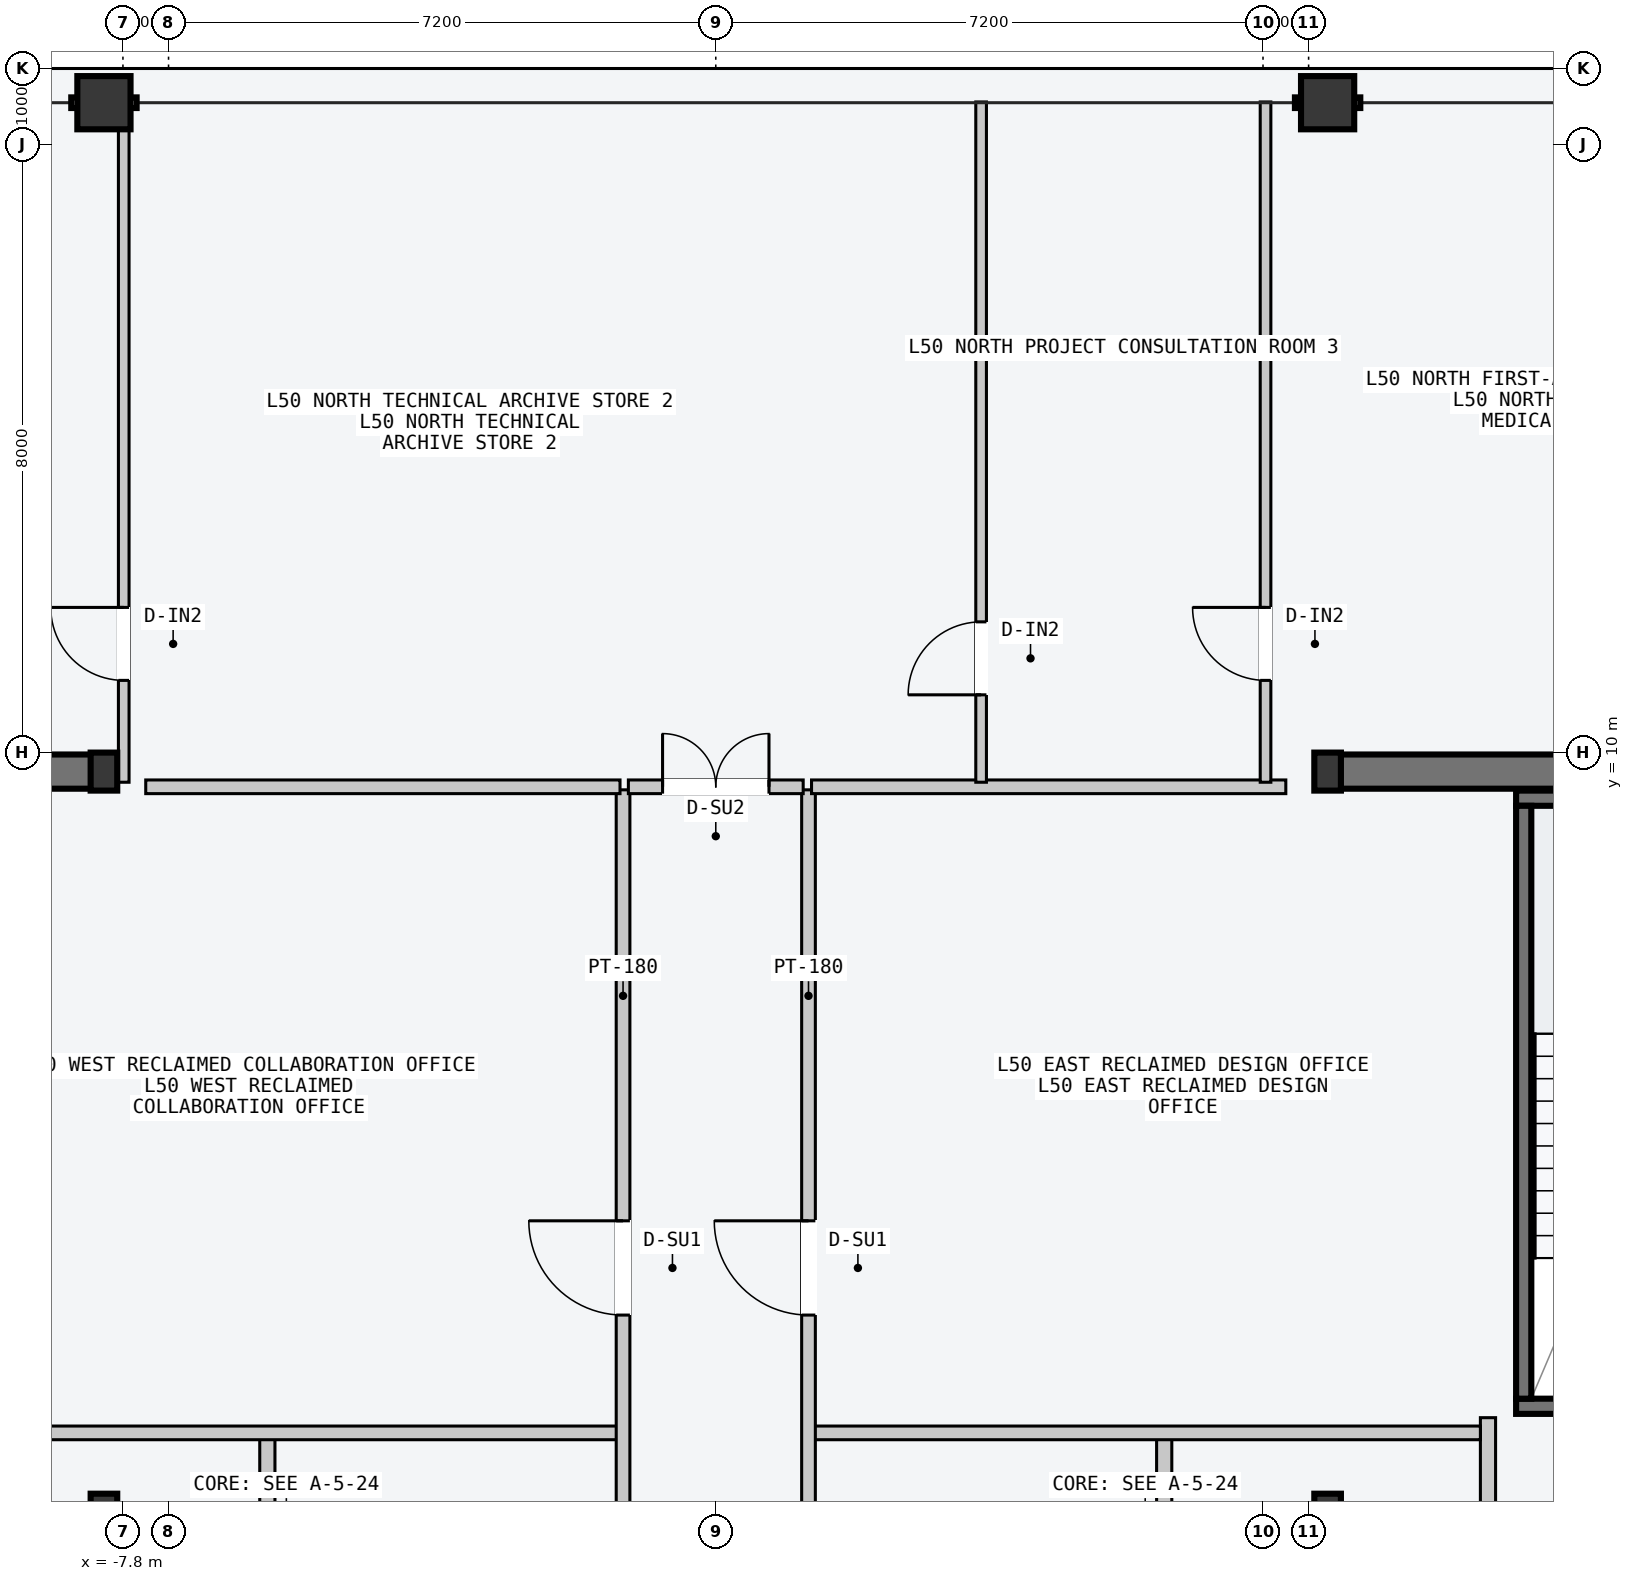
"""IFC4 building model, lengths in metres.
Left out: names, types, materials, properties, quantities, classifications, styles, units other than length and angle.
Written with IfcOpenShell. Run it as: python <this file> out.ifc"""

import sys

from ifc_helpers import new_model, si_unit, direction, frame, frame_2d, origin, origin_2d, place, context, subcontext, project, spatial, rectangle, hollow_rectangle, i_section, extrude, element, fill, save


model = new_model("IFC4")
c1 = context("Model", 3, precision=1e-05, world=origin(), true_north=direction((0.0, 1.0)))
c2 = subcontext(c1, "Body", "Model", "MODEL_VIEW")
j1 = project(units=[si_unit("LENGTHUNIT", "METRE"), si_unit("PLANEANGLEUNIT", "RADIAN")], contexts=[c1])
p1 = place(None, origin())
s1 = spatial("IfcSite", under=j1, at=p1, CompositionType="ELEMENT")
p2 = place(p1, origin())
s2 = spatial("IfcBuilding", under=s1, at=p2, CompositionType="ELEMENT")
p3 = place(p2, frame((0.0, 0.0, 191.1)))
s3 = spatial("IfcBuildingStorey", under=s2, at=p3, CompositionType="ELEMENT", Elevation=191.1)
for number, where, z_axis, x_axis in (
    (1, (-14.53, 9.75, -0.2), (0.0, 0.0, 1.0), (1.0, 0.0, 0.0)),
    (2, (8.07, 9.75, -0.2), (0.0, 0.0, 1.0), (1.0, 0.0, 0.0)),
):
    element("IfcWall", number, at=place(p3, frame(where, z_axis=z_axis, x_axis=x_axis)), inside=s3, PredefinedType="SHEAR", context=c2, shape_type="SweptSolid", body=[
        extrude(rectangle(XDim=6.46, YDim=0.45, at=frame_2d((3.23, 0.0))), origin(), (0.0, 0.0, 1.0), 3.6),
    ])
p4 = place(p3, frame((10.53, 1.4, -0.2), z_axis=(0.0, 0.0, 1.0), x_axis=(1.0, 0.0, 0.0)))
e3 = element("IfcWall", 3, at=p4, inside=s3, PredefinedType="SOLIDWALL", context=c2, shape_type="SweptSolid", body=[
    extrude(rectangle(XDim=3.72, YDim=0.2, at=frame_2d((1.86, 0.0))), origin(), (0.0, 0.0, 1.0), 3.6),
])
p5 = place(p4, frame((1.5, 0.0, 0.2)))
e4 = element("IfcOpeningElement", 4, at=p5, cuts=e3, PredefinedType="OPENING", context=c2, shape_type="SweptSolid", body=[
    extrude(rectangle(XDim=1.12, YDim=2.18, at=frame_2d((0.56, 1.09))), frame((0.0, 0.11, 0.0), z_axis=(0.0, -1.0, 0.0), x_axis=(1.0, 0.0, 0.0)), (0.0, 0.0, 1.0), 0.22),
])
p6 = place(p3, frame((10.53, 9.4, -0.2), z_axis=(0.0, 0.0, 1.0), x_axis=(1.0, 0.0, 0.0)))
e5 = element("IfcWall", 5, at=p6, inside=s3, PredefinedType="SOLIDWALL", context=c2, shape_type="SweptSolid", body=[
    extrude(rectangle(XDim=3.72, YDim=0.2, at=frame_2d((1.86, 0.0))), origin(), (0.0, 0.0, 1.0), 3.6),
])
p7 = place(p3, frame((10.63, 1.5, -0.2), z_axis=(0.0, 0.0, 1.0), x_axis=(0.0, 1.0, 0.0)))
e6 = element("IfcWall", 6, at=p7, inside=s3, PredefinedType="SOLIDWALL", context=c2, shape_type="SweptSolid", body=[
    extrude(rectangle(XDim=7.8, YDim=0.2, at=frame_2d((3.9, 0.0))), origin(), (0.0, 0.0, 1.0), 3.6),
])
for number, where, z_axis, x_axis in (
    (7, (-8.05, 0.0, 0.0), (0.0, 0.0, 1.0), (1.0, 0.0, 0.0)),
    (8, (-8.05, 9.75, 0.0), (0.0, 0.0, 1.0), (1.0, 0.0, 0.0)),
    (9, (8.05, 0.0, 0.0), (0.0, 0.0, 1.0), (1.0, 0.0, 0.0)),
    (10, (8.05, 9.75, 0.0), (0.0, 0.0, 1.0), (1.0, 0.0, 0.0)),
):
    element("IfcColumn", number, at=place(p3, frame(where, z_axis=z_axis, x_axis=x_axis)), inside=s3, PredefinedType="COLUMN", context=c2, shape_type="SweptSolid", body=[
        extrude(i_section(OverallWidth=0.35, OverallDepth=0.5, WebThickness=0.02, FlangeThickness=0.032, at=origin_2d()), origin(), (0.0, 0.0, 1.0), 3.6),
    ])
for number, where, z_axis, x_axis in (
    (11, (-8.05, 18.55, 0.0), (0.0, 0.0, 1.0), (1.0, 0.0, 0.0)),
    (12, (8.05, 18.55, 0.0), (0.0, 0.0, 1.0), (1.0, 0.0, 0.0)),
):
    element("IfcColumn", number, at=place(p3, frame(where, z_axis=z_axis, x_axis=x_axis)), inside=s3, PredefinedType="COLUMN", context=c2, shape_type="SweptSolid", body=[
        extrude(hollow_rectangle(XDim=0.7, YDim=0.7, WallThickness=0.03, at=origin_2d()), origin(), (0.0, 0.0, 1.0), 3.6),
    ])
p8 = place(p3, frame((-5.9, -9.45, 0.0), z_axis=(0.0, 0.0, 1.0), x_axis=(0.0, 1.0, 0.0)))
e13 = element("IfcWall", 13, at=p8, inside=s3, PredefinedType="PARTITIONING", context=c2, shape_type="SweptSolid", body=[
    extrude(rectangle(XDim=10.5, YDim=0.2, at=frame_2d((5.25, 0.0))), origin(), (0.0, 0.0, 1.0), 3.4),
])
p9 = place(p8, frame((3.9, 0.0, 0.0)))
e14 = element("IfcOpeningElement", 14, at=p9, cuts=e13, PredefinedType="OPENING", context=c2, shape_type="SweptSolid", body=[
    extrude(rectangle(XDim=1.5, YDim=2.2, at=frame_2d((0.75, 1.1))), frame((0.0, 0.11, 0.0), z_axis=(0.0, -1.0, 0.0), x_axis=(1.0, 0.0, 0.0)), (0.0, 0.0, 1.0), 0.22),
])
p10 = place(p3, frame((5.9, -9.45, 0.0), z_axis=(0.0, 0.0, 1.0), x_axis=(0.0, 1.0, 0.0)))
e15 = element("IfcWall", 15, at=p10, inside=s3, PredefinedType="PARTITIONING", context=c2, shape_type="SweptSolid", body=[
    extrude(rectangle(XDim=10.5, YDim=0.2, at=frame_2d((5.25, 0.0))), origin(), (0.0, 0.0, 1.0), 3.4),
])
p11 = place(p10, frame((3.9, 0.0, 0.0)))
e16 = element("IfcOpeningElement", 16, at=p11, cuts=e15, PredefinedType="OPENING", context=c2, shape_type="SweptSolid", body=[
    extrude(rectangle(XDim=1.5, YDim=2.2, at=frame_2d((0.75, 1.1))), frame((0.0, 0.11, 0.0), z_axis=(0.0, -1.0, 0.0), x_axis=(1.0, 0.0, 0.0)), (0.0, 0.0, 1.0), 0.22),
])
p12 = place(p3, frame((10.16, -2.55, 0.0), z_axis=(0.0, 0.0, 1.0), x_axis=(0.0, 1.0, 0.0)))
e17 = element("IfcWall", 17, at=p12, inside=s3, PredefinedType="PARTITIONING", context=c2, shape_type="SweptSolid", body=[
    extrude(rectangle(XDim=3.8, YDim=0.2, at=frame_2d((1.9, 0.0))), origin(), (0.0, 0.0, 1.0), 3.4),
])
p13 = place(p12, frame((1.3, 0.0, 0.0)))
e18 = element("IfcOpeningElement", 18, at=p13, cuts=e17, PredefinedType="OPENING", context=c2, shape_type="SweptSolid", body=[
    extrude(rectangle(XDim=1.1, YDim=2.15, at=frame_2d((0.55, 1.075))), frame((0.0, 0.11, 0.0), z_axis=(0.0, -1.0, 0.0), x_axis=(1.0, 0.0, 0.0)), (0.0, 0.0, 1.0), 0.22),
])
p14 = place(p3, frame((-10.05, 1.05, 0.0), z_axis=(0.0, 0.0, 1.0), x_axis=(1.0, 0.0, 0.0)))
e19 = element("IfcWall", 19, at=p14, inside=s3, PredefinedType="PARTITIONING", context=c2, shape_type="SweptSolid", body=[
    extrude(rectangle(XDim=8.79, YDim=0.18, at=frame_2d((4.395, 0.0))), origin(), (0.0, 0.0, 1.0), 3.4),
])
p15 = place(p3, frame((-1.22, -3.5, 0.0), z_axis=(0.0, 0.0, 1.0), x_axis=(0.0, 1.0, 0.0)))
e20 = element("IfcWall", 20, at=p15, inside=s3, PredefinedType="PARTITIONING", context=c2, shape_type="SweptSolid", body=[
    extrude(rectangle(XDim=13.01, YDim=0.18, at=frame_2d((6.505, 0.0))), origin(), (0.0, 0.0, 1.0), 3.4),
])
p16 = place(p15, frame((6.1, 0.0, 0.0)))
e21 = element("IfcOpeningElement", 21, at=p16, cuts=e20, PredefinedType="OPENING", context=c2, shape_type="SweptSolid", body=[
    extrude(rectangle(XDim=1.24, YDim=2.24, at=frame_2d((0.62, 1.12))), frame((0.0, 0.1, 0.0), z_axis=(0.0, -1.0, 0.0), x_axis=(1.0, 0.0, 0.0)), (0.0, 0.0, 1.0), 0.2),
])
p17 = place(p15, frame((1.6, 0.0, 0.0)))
e22 = element("IfcOpeningElement", 22, at=p17, cuts=e20, PredefinedType="OPENING", context=c2, shape_type="SweptSolid", body=[
    extrude(rectangle(XDim=0.96, YDim=2.18, at=frame_2d((0.48, 1.09))), frame((0.0, 0.1, 0.0), z_axis=(0.0, -1.0, 0.0), x_axis=(1.0, 0.0, 0.0)), (0.0, 0.0, 1.0), 0.2),
])
p18 = place(p3, frame((-7.5, 9.55, 0.0), z_axis=(0.0, 0.0, 1.0), x_axis=(1.0, 0.0, 0.0)))
e23 = element("IfcWall", 23, at=p18, inside=s3, PredefinedType="PARTITIONING", context=c2, shape_type="SweptSolid", body=[
    extrude(rectangle(XDim=6.24, YDim=0.18, at=frame_2d((3.12, 0.0))), origin(), (0.0, 0.0, 1.0), 3.4),
])
p19 = place(p3, frame((1.26, 1.05, 0.0), z_axis=(0.0, 0.0, 1.0), x_axis=(1.0, 0.0, 0.0)))
e24 = element("IfcWall", 24, at=p19, inside=s3, PredefinedType="PARTITIONING", context=c2, shape_type="SweptSolid", body=[
    extrude(rectangle(XDim=8.8, YDim=0.18, at=frame_2d((4.4, 0.0))), origin(), (0.0, 0.0, 1.0), 3.4),
])
p20 = place(p3, frame((1.22, -3.5, 0.0), z_axis=(0.0, 0.0, 1.0), x_axis=(0.0, 1.0, 0.0)))
e25 = element("IfcWall", 25, at=p20, inside=s3, PredefinedType="PARTITIONING", context=c2, shape_type="SweptSolid", body=[
    extrude(rectangle(XDim=13.01, YDim=0.18, at=frame_2d((6.505, 0.0))), origin(), (0.0, 0.0, 1.0), 3.4),
])
p21 = place(p20, frame((6.1, 0.0, 0.0)))
e26 = element("IfcOpeningElement", 26, at=p21, cuts=e25, PredefinedType="OPENING", context=c2, shape_type="SweptSolid", body=[
    extrude(rectangle(XDim=1.24, YDim=2.24, at=frame_2d((0.62, 1.12))), frame((0.0, 0.1, 0.0), z_axis=(0.0, -1.0, 0.0), x_axis=(1.0, 0.0, 0.0)), (0.0, 0.0, 1.0), 0.2),
])
p22 = place(p20, frame((1.6, 0.0, 0.0)))
e27 = element("IfcOpeningElement", 27, at=p22, cuts=e25, PredefinedType="OPENING", context=c2, shape_type="SweptSolid", body=[
    extrude(rectangle(XDim=0.96, YDim=2.18, at=frame_2d((0.48, 1.09))), frame((0.0, 0.1, 0.0), z_axis=(0.0, -1.0, 0.0), x_axis=(1.0, 0.0, 0.0)), (0.0, 0.0, 1.0), 0.2),
])
p23 = place(p3, frame((1.26, 9.55, 0.0), z_axis=(0.0, 0.0, 1.0), x_axis=(1.0, 0.0, 0.0)))
e28 = element("IfcWall", 28, at=p23, inside=s3, PredefinedType="PARTITIONING", context=c2, shape_type="SweptSolid", body=[
    extrude(rectangle(XDim=6.24, YDim=0.18, at=frame_2d((3.12, 0.0))), origin(), (0.0, 0.0, 1.0), 3.4),
])
p24 = place(p3, frame((-7.79, 9.61, 0.0), z_axis=(0.0, 0.0, 1.0), x_axis=(0.0, 1.0, 0.0)))
e29 = element("IfcWall", 29, at=p24, inside=s3, PredefinedType="PARTITIONING", context=c2, shape_type="SweptSolid", body=[
    extrude(rectangle(XDim=8.95, YDim=0.14, at=frame_2d((4.475, 0.0))), origin(), (0.0, 0.0, 1.0), 3.4),
])
p25 = place(p24, frame((1.34, 0.0, 0.0)))
e30 = element("IfcOpeningElement", 30, at=p25, cuts=e29, PredefinedType="OPENING", context=c2, shape_type="SweptSolid", body=[
    extrude(rectangle(XDim=0.96, YDim=2.18, at=frame_2d((0.48, 1.09))), frame((0.0, 0.08, 0.0), z_axis=(0.0, -1.0, 0.0), x_axis=(1.0, 0.0, 0.0)), (0.0, 0.0, 1.0), 0.16),
])
p26 = place(p3, frame((3.491, 9.61, 0.0), z_axis=(0.0, 0.0, 1.0), x_axis=(0.0, 1.0, 0.0)))
e31 = element("IfcWall", 31, at=p26, inside=s3, PredefinedType="PARTITIONING", context=c2, shape_type="SweptSolid", body=[
    extrude(rectangle(XDim=8.95, YDim=0.14, at=frame_2d((4.475, 0.0))), origin(), (0.0, 0.0, 1.0), 3.4),
])
p27 = place(p26, frame((1.15, 0.0, 0.0)))
e32 = element("IfcOpeningElement", 32, at=p27, cuts=e31, PredefinedType="OPENING", context=c2, shape_type="SweptSolid", body=[
    extrude(rectangle(XDim=0.96, YDim=2.18, at=frame_2d((0.48, 1.09))), frame((0.0, 0.08, 0.0), z_axis=(0.0, -1.0, 0.0), x_axis=(1.0, 0.0, 0.0)), (0.0, 0.0, 1.0), 0.16),
])
p28 = place(p3, frame((7.233, 9.61, 0.0), z_axis=(0.0, 0.0, 1.0), x_axis=(0.0, 1.0, 0.0)))
e33 = element("IfcWall", 33, at=p28, inside=s3, PredefinedType="PARTITIONING", context=c2, shape_type="SweptSolid", body=[
    extrude(rectangle(XDim=8.95, YDim=0.14, at=frame_2d((4.475, 0.0))), origin(), (0.0, 0.0, 1.0), 3.4),
])
p29 = place(p28, frame((1.34, 0.0, 0.0)))
e34 = element("IfcOpeningElement", 34, at=p29, cuts=e33, PredefinedType="OPENING", context=c2, shape_type="SweptSolid", body=[
    extrude(rectangle(XDim=0.96, YDim=2.18, at=frame_2d((0.48, 1.09))), frame((0.0, 0.08, 0.0), z_axis=(0.0, -1.0, 0.0), x_axis=(1.0, 0.0, 0.0)), (0.0, 0.0, 1.0), 0.16),
])
p30 = place(p3, frame((-1.15, 9.55, 0.0), z_axis=(0.0, 0.0, 1.0), x_axis=(1.0, 0.0, 0.0)))
e35 = element("IfcWall", 35, at=p30, inside=s3, PredefinedType="PARTITIONING", context=c2, shape_type="SweptSolid", body=[
    extrude(rectangle(XDim=2.3, YDim=0.18, at=frame_2d((1.15, 0.0))), origin(), (0.0, 0.0, 1.0), 3.4),
])
p31 = place(p30, frame((0.45, 0.0, 0.0)))
e36 = element("IfcOpeningElement", 36, at=p31, cuts=e35, PredefinedType="OPENING", context=c2, shape_type="SweptSolid", body=[
    extrude(rectangle(XDim=1.4, YDim=2.2, at=frame_2d((0.7, 1.1))), frame((0.0, 0.1, 0.0), z_axis=(0.0, -1.0, 0.0), x_axis=(1.0, 0.0, 0.0)), (0.0, 0.0, 1.0), 0.2),
])
p32 = place(p16, origin())
e37 = element("IfcDoor", 37, at=p32, inside=s3, OperationType="SINGLE_SWING_RIGHT", PredefinedType="DOOR", context=c2, shape_type="SweptSolid", body=[
    extrude(rectangle(XDim=1.24, YDim=2.24, at=frame_2d((0.62, 1.12))), frame((0.0, 0.025, 0.0), z_axis=(0.0, -1.0, 0.0), x_axis=(1.0, 0.0, 0.0)), (0.0, 0.0, 1.0), 0.05),
])
fill(e21, e37)
p33 = place(p21, origin())
e38 = element("IfcDoor", 38, at=p33, inside=s3, OperationType="SINGLE_SWING_RIGHT", PredefinedType="DOOR", context=c2, shape_type="SweptSolid", body=[
    extrude(rectangle(XDim=1.24, YDim=2.24, at=frame_2d((0.62, 1.12))), frame((0.0, 0.025, 0.0), z_axis=(0.0, -1.0, 0.0), x_axis=(1.0, 0.0, 0.0)), (0.0, 0.0, 1.0), 0.05),
])
fill(e26, e38)
p34 = place(p25, origin())
e39 = element("IfcDoor", 39, at=p34, inside=s3, OperationType="SINGLE_SWING_RIGHT", PredefinedType="DOOR", context=c2, shape_type="SweptSolid", body=[
    extrude(rectangle(XDim=0.96, YDim=2.18, at=frame_2d((0.48, 1.09))), frame((0.0, 0.025, 0.0), z_axis=(0.0, -1.0, 0.0), x_axis=(1.0, 0.0, 0.0)), (0.0, 0.0, 1.0), 0.05),
])
fill(e30, e39)
p35 = place(p27, origin())
e40 = element("IfcDoor", 40, at=p35, inside=s3, OperationType="SINGLE_SWING_LEFT", PredefinedType="DOOR", context=c2, shape_type="SweptSolid", body=[
    extrude(rectangle(XDim=0.96, YDim=2.18, at=frame_2d((0.48, 1.09))), frame((0.0, 0.025, 0.0), z_axis=(0.0, -1.0, 0.0), x_axis=(1.0, 0.0, 0.0)), (0.0, 0.0, 1.0), 0.05),
])
fill(e32, e40)
p36 = place(p29, origin())
e41 = element("IfcDoor", 41, at=p36, inside=s3, OperationType="SINGLE_SWING_RIGHT", PredefinedType="DOOR", context=c2, shape_type="SweptSolid", body=[
    extrude(rectangle(XDim=0.96, YDim=2.18, at=frame_2d((0.48, 1.09))), frame((0.0, 0.025, 0.0), z_axis=(0.0, -1.0, 0.0), x_axis=(1.0, 0.0, 0.0)), (0.0, 0.0, 1.0), 0.05),
])
fill(e34, e41)
p37 = place(p31, origin())
e42 = element("IfcDoor", 42, at=p37, inside=s3, OperationType="DOUBLE_DOOR_SINGLE_SWING", PredefinedType="DOOR", context=c2, shape_type="SweptSolid", body=[
    extrude(rectangle(XDim=1.4, YDim=2.2, at=frame_2d((0.7, 1.1))), frame((0.0, 0.025, 0.0), z_axis=(0.0, -1.0, 0.0), x_axis=(1.0, 0.0, 0.0)), (0.0, 0.0, 1.0), 0.05),
])
fill(e36, e42)
save(model, sys.argv[1])
